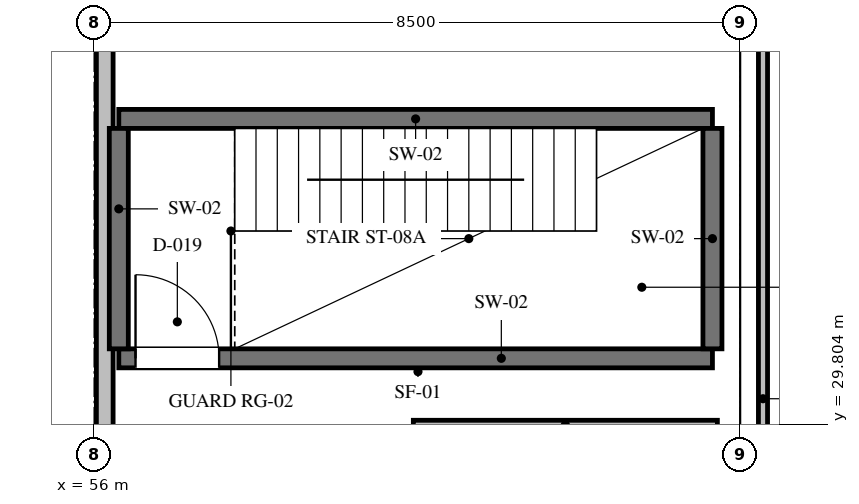
"""IFC4 building model, lengths in metres.
Left out: names, types, materials, properties, quantities, classifications, styles, units other than length and angle.
Written with IfcOpenShell. Run it as: python <this file> out.ifc"""

import sys

from ifc_helpers import new_model, si_unit, direction, frame, frame_2d, origin, place, context, subcontext, project, spatial, rectangle, extrude, element, fill, save


model = new_model("IFC4")
c1 = context("Model", 3, precision=1e-05, world=origin(), true_north=direction((0.0, 1.0)))
c2 = subcontext(c1, "Body", "Model", "MODEL_VIEW")
j1 = project(units=[si_unit("LENGTHUNIT", "METRE"), si_unit("PLANEANGLEUNIT", "RADIAN")], contexts=[c1])
p1 = place(None, origin())
s1 = spatial("IfcSite", under=j1, at=p1, CompositionType="ELEMENT")
p2 = place(p1, origin())
s2 = spatial("IfcBuilding", under=s1, at=p2, CompositionType="ELEMENT")
p3 = place(p2, frame((0.0, 0.0, 5.85)))
s3 = spatial("IfcBuildingStorey", under=s2, at=p3, CompositionType="ELEMENT", Elevation=5.85)
p4 = place(p3, frame((56.14, 11.65, 0.0), z_axis=(0.0, 0.0, 1.0), x_axis=(0.0, 1.0, 0.0)))
e1 = element("IfcWall", 1, at=p4, inside=s3, PredefinedType="SOLIDWALL", context=c2, shape_type="SweptSolid", body=[
    extrude(rectangle(XDim=23.575, YDim=0.22, at=frame_2d((11.788, 0.0))), origin(), (0.0, 0.0, 1.0), 3.594),
])
p5 = place(p3, frame((56.325, 30.675, 0.0), z_axis=(0.0, 0.0, 1.0), x_axis=(1.0, 0.0, 0.0)))
e2 = element("IfcWall", 2, at=p5, inside=s3, PredefinedType="SHEAR", context=c2, shape_type="SweptSolid", body=[
    extrude(rectangle(XDim=7.81, YDim=0.25, at=frame_2d((3.905, 0.0))), origin(), (0.0, 0.0, 1.0), 4.0),
])
p6 = place(p5, frame((0.22, 0.0, 0.0)))
e3 = element("IfcOpeningElement", 3, at=p6, cuts=e2, PredefinedType="OPENING", context=c2, shape_type="SweptSolid", body=[
    extrude(rectangle(XDim=1.1, YDim=2.15, at=frame_2d((0.55, 1.075))), frame((0.0, 0.135, 0.0), z_axis=(0.0, -1.0, 0.0), x_axis=(1.0, 0.0, 0.0)), (0.0, 0.0, 1.0), 0.27),
])
p7 = place(p3, frame((56.325, 33.825, 0.0), z_axis=(0.0, 0.0, 1.0), x_axis=(1.0, 0.0, 0.0)))
e4 = element("IfcWall", 4, at=p7, inside=s3, PredefinedType="SHEAR", context=c2, shape_type="SweptSolid", body=[
    extrude(rectangle(XDim=7.81, YDim=0.25, at=frame_2d((3.905, 0.0))), origin(), (0.0, 0.0, 1.0), 4.0),
])
for number, where, z_axis, x_axis in (
    (5, (56.325, 30.8, 0.0), (0.0, 0.0, 1.0), (0.0, 1.0, 0.0)),
    (6, (64.135, 30.8, 0.0), (0.0, 0.0, 1.0), (0.0, 1.0, 0.0)),
):
    element("IfcWall", number, at=place(p3, frame(where, z_axis=z_axis, x_axis=x_axis)), inside=s3, PredefinedType="SHEAR", context=c2, shape_type="SweptSolid", body=[
        extrude(rectangle(XDim=2.9, YDim=0.25, at=frame_2d((1.45, 0.0))), origin(), (0.0, 0.0, 1.0), 4.0),
    ])
p8 = place(p3, frame((60.2, 29.8, 0.0), z_axis=(0.0, 0.0, 1.0), x_axis=(1.0, 0.0, 0.0)))
e7 = element("IfcWall", 7, at=p8, inside=s3, PredefinedType="PARTITIONING", context=c2, shape_type="SweptSolid", body=[
    extrude(rectangle(XDim=4.0, YDim=0.12, at=frame_2d((2.0, 0.0))), origin(), (0.0, 0.0, 1.0), 4.0),
])
p9 = place(p3, frame((64.8, 24.263, 0.0), z_axis=(0.0, 0.0, 1.0), x_axis=(0.0, 1.0, 0.0)))
e8 = element("IfcWall", 8, at=p9, inside=s3, PredefinedType="PARTITIONING", context=c2, shape_type="SweptSolid", body=[
    extrude(rectangle(XDim=10.524, YDim=0.12, at=frame_2d((5.262, 0.0))), origin(), (0.0, 0.0, 1.0), 3.594),
])
p10 = place(p6, frame((1.1, 0.0, 0.0), z_axis=(0.0, 0.0, 1.0), x_axis=(-1.0, 0.0, 0.0)))
e9 = element("IfcDoor", 9, at=p10, inside=s3, OperationType="SINGLE_SWING_LEFT", PredefinedType="DOOR", context=c2, shape_type="SweptSolid", body=[
    extrude(rectangle(XDim=1.1, YDim=2.15, at=frame_2d((0.55, 1.075))), frame((0.0, 0.025, 0.0), z_axis=(0.0, -1.0, 0.0), x_axis=(1.0, 0.0, 0.0)), (0.0, 0.0, 1.0), 0.05),
])
fill(e3, e9)
save(model, sys.argv[1])
